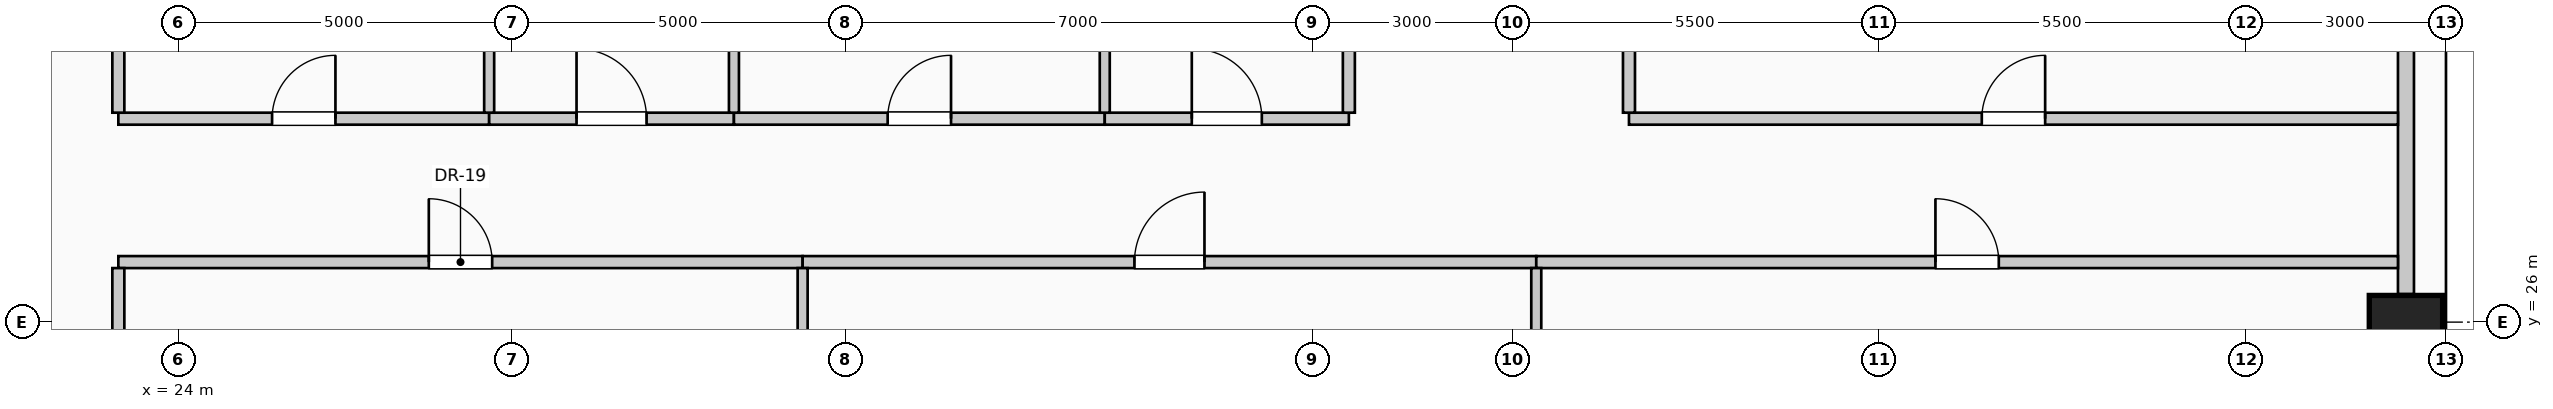
"""IFC4 building model, lengths in metres.
Left out: names, types, materials, properties, quantities, classifications, styles, units other than length and angle.
Written with IfcOpenShell. Run it as: python <this file> out.ifc"""

import sys

from ifc_helpers import new_model, si_unit, direction, frame, frame_2d, origin, origin_2d, place, context, subcontext, project, spatial, rectangle, extrude, element, fill, save


model = new_model("IFC4")
c1 = context("Model", 3, precision=1e-05, world=origin(), true_north=direction((0.0, 1.0)))
c2 = subcontext(c1, "Body", "Model", "MODEL_VIEW")
j1 = project(units=[si_unit("LENGTHUNIT", "METRE"), si_unit("PLANEANGLEUNIT", "RADIAN")], contexts=[c1])
p1 = place(None, origin())
s1 = spatial("IfcSite", under=j1, at=p1, CompositionType="ELEMENT")
p2 = place(p1, origin())
s2 = spatial("IfcBuilding", under=s1, at=p2, CompositionType="ELEMENT")
p3 = place(p2, frame((0.0, 0.0, 174.6)))
s3 = spatial("IfcBuildingStorey", under=s2, at=p3, CompositionType="ELEMENT", Elevation=174.6)
p4 = place(p3, frame((57.4, 26.0, 0.0), z_axis=(0.0, 0.0, 1.0), x_axis=(0.0, 1.0, 0.0)))
e1 = element("IfcColumn", 1, at=p4, inside=s3, PredefinedType="COLUMN", context=c2, shape_type="SweptSolid", body=[
    extrude(rectangle(XDim=0.8, YDim=1.1, at=origin_2d()), origin(), (0.0, 0.0, 1.0), 4.0),
])
p5 = place(p3, frame((57.4, 33.58, 0.0), z_axis=(0.0, 0.0, 1.0), x_axis=(0.0, -1.0, 0.0)))
e2 = element("IfcWall", 2, at=p5, inside=s3, PredefinedType="SOLIDWALL", context=c2, shape_type="SweptSolid", body=[
    extrude(rectangle(XDim=7.16, YDim=0.24, at=frame_2d((3.58, 0.0))), origin(), (0.0, 0.0, 1.0), 2.975),
])
p6 = place(p3, frame((23.1, 26.9, 0.0), z_axis=(0.0, 0.0, 1.0), x_axis=(1.0, 0.0, 0.0)))
e3 = element("IfcWall", 3, at=p6, inside=s3, PredefinedType="PARTITIONING", context=c2, shape_type="SweptSolid", body=[
    extrude(rectangle(XDim=10.26, YDim=0.18, at=frame_2d((5.13, 0.0))), origin(), (0.0, 0.0, 1.0), 3.725),
])
p7 = place(p6, frame((4.655, 0.0, 0.0)))
e4 = element("IfcOpeningElement", 4, at=p7, cuts=e3, PredefinedType="OPENING", context=c2, shape_type="SweptSolid", body=[
    extrude(rectangle(XDim=0.95, YDim=2.15, at=frame_2d((0.475, 1.075))), frame((0.0, 0.1, 0.0), z_axis=(0.0, -1.0, 0.0), x_axis=(1.0, 0.0, 0.0)), (0.0, 0.0, 1.0), 0.2),
])
p8 = place(p3, frame((33.36, 26.9, 0.0), z_axis=(0.0, 0.0, 1.0), x_axis=(1.0, 0.0, 0.0)))
e5 = element("IfcWall", 5, at=p8, inside=s3, PredefinedType="PARTITIONING", context=c2, shape_type="SweptSolid", body=[
    extrude(rectangle(XDim=11.0, YDim=0.18, at=frame_2d((5.5, 0.0))), origin(), (0.0, 0.0, 1.0), 3.725),
])
p9 = place(p8, frame((4.975, 0.0, 0.0)))
e6 = element("IfcOpeningElement", 6, at=p9, cuts=e5, PredefinedType="OPENING", context=c2, shape_type="SweptSolid", body=[
    extrude(rectangle(XDim=1.05, YDim=2.15, at=frame_2d((0.525, 1.075))), frame((0.0, 0.1, 0.0), z_axis=(0.0, -1.0, 0.0), x_axis=(1.0, 0.0, 0.0)), (0.0, 0.0, 1.0), 0.2),
])
p10 = place(p3, frame((44.36, 26.9, 0.0), z_axis=(0.0, 0.0, 1.0), x_axis=(1.0, 0.0, 0.0)))
e7 = element("IfcWall", 7, at=p10, inside=s3, PredefinedType="PARTITIONING", context=c2, shape_type="SweptSolid", body=[
    extrude(rectangle(XDim=12.92, YDim=0.18, at=frame_2d((6.46, 0.0))), origin(), (0.0, 0.0, 1.0), 3.725),
])
p11 = place(p10, frame((5.985, 0.0, 0.0)))
e8 = element("IfcOpeningElement", 8, at=p11, cuts=e7, PredefinedType="OPENING", context=c2, shape_type="SweptSolid", body=[
    extrude(rectangle(XDim=0.95, YDim=2.15, at=frame_2d((0.475, 1.075))), frame((0.0, 0.1, 0.0), z_axis=(0.0, -1.0, 0.0), x_axis=(1.0, 0.0, 0.0)), (0.0, 0.0, 1.0), 0.2),
])
p12 = place(p3, frame((23.1, 29.05, 0.0), z_axis=(0.0, 0.0, 1.0), x_axis=(1.0, 0.0, 0.0)))
e9 = element("IfcWall", 9, at=p12, inside=s3, PredefinedType="PARTITIONING", context=c2, shape_type="SweptSolid", body=[
    extrude(rectangle(XDim=5.56, YDim=0.18, at=frame_2d((2.78, 0.0))), origin(), (0.0, 0.0, 1.0), 3.725),
])
p13 = place(p12, frame((2.305, 0.0, 0.0)))
e10 = element("IfcOpeningElement", 10, at=p13, cuts=e9, PredefinedType="OPENING", context=c2, shape_type="SweptSolid", body=[
    extrude(rectangle(XDim=0.95, YDim=2.15, at=frame_2d((0.475, 1.075))), frame((0.0, 0.1, 0.0), z_axis=(0.0, -1.0, 0.0), x_axis=(1.0, 0.0, 0.0)), (0.0, 0.0, 1.0), 0.2),
])
p14 = place(p3, frame((28.66, 29.05, 0.0), z_axis=(0.0, 0.0, 1.0), x_axis=(1.0, 0.0, 0.0)))
e11 = element("IfcWall", 11, at=p14, inside=s3, PredefinedType="PARTITIONING", context=c2, shape_type="SweptSolid", body=[
    extrude(rectangle(XDim=3.67, YDim=0.18, at=frame_2d((1.835, 0.0))), origin(), (0.0, 0.0, 1.0), 3.725),
])
p15 = place(p14, frame((1.31, 0.0, 0.0)))
e12 = element("IfcOpeningElement", 12, at=p15, cuts=e11, PredefinedType="OPENING", context=c2, shape_type="SweptSolid", body=[
    extrude(rectangle(XDim=1.05, YDim=2.15, at=frame_2d((0.525, 1.075))), frame((0.0, 0.1, 0.0), z_axis=(0.0, -1.0, 0.0), x_axis=(1.0, 0.0, 0.0)), (0.0, 0.0, 1.0), 0.2),
])
p16 = place(p3, frame((32.33, 29.05, 0.0), z_axis=(0.0, 0.0, 1.0), x_axis=(1.0, 0.0, 0.0)))
e13 = element("IfcWall", 13, at=p16, inside=s3, PredefinedType="PARTITIONING", context=c2, shape_type="SweptSolid", body=[
    extrude(rectangle(XDim=5.56, YDim=0.18, at=frame_2d((2.78, 0.0))), origin(), (0.0, 0.0, 1.0), 3.725),
])
p17 = place(p16, frame((2.305, 0.0, 0.0)))
e14 = element("IfcOpeningElement", 14, at=p17, cuts=e13, PredefinedType="OPENING", context=c2, shape_type="SweptSolid", body=[
    extrude(rectangle(XDim=0.95, YDim=2.15, at=frame_2d((0.475, 1.075))), frame((0.0, 0.1, 0.0), z_axis=(0.0, -1.0, 0.0), x_axis=(1.0, 0.0, 0.0)), (0.0, 0.0, 1.0), 0.2),
])
p18 = place(p3, frame((37.89, 29.05, 0.0), z_axis=(0.0, 0.0, 1.0), x_axis=(1.0, 0.0, 0.0)))
e15 = element("IfcWall", 15, at=p18, inside=s3, PredefinedType="PARTITIONING", context=c2, shape_type="SweptSolid", body=[
    extrude(rectangle(XDim=3.66, YDim=0.18, at=frame_2d((1.83, 0.0))), origin(), (0.0, 0.0, 1.0), 3.725),
])
p19 = place(p18, frame((1.305, 0.0, 0.0)))
e16 = element("IfcOpeningElement", 16, at=p19, cuts=e15, PredefinedType="OPENING", context=c2, shape_type="SweptSolid", body=[
    extrude(rectangle(XDim=1.05, YDim=2.15, at=frame_2d((0.525, 1.075))), frame((0.0, 0.1, 0.0), z_axis=(0.0, -1.0, 0.0), x_axis=(1.0, 0.0, 0.0)), (0.0, 0.0, 1.0), 0.2),
])
p20 = place(p3, frame((45.75, 29.05, 0.0), z_axis=(0.0, 0.0, 1.0), x_axis=(1.0, 0.0, 0.0)))
e17 = element("IfcWall", 17, at=p20, inside=s3, PredefinedType="PARTITIONING", context=c2, shape_type="SweptSolid", body=[
    extrude(rectangle(XDim=11.53, YDim=0.18, at=frame_2d((5.765, 0.0))), origin(), (0.0, 0.0, 1.0), 3.725),
])
p21 = place(p20, frame((5.29, 0.0, 0.0)))
e18 = element("IfcOpeningElement", 18, at=p21, cuts=e17, PredefinedType="OPENING", context=c2, shape_type="SweptSolid", body=[
    extrude(rectangle(XDim=0.95, YDim=2.15, at=frame_2d((0.475, 1.075))), frame((0.0, 0.1, 0.0), z_axis=(0.0, -1.0, 0.0), x_axis=(1.0, 0.0, 0.0)), (0.0, 0.0, 1.0), 0.2),
])
p22 = place(p3, frame((23.1, 17.3, 0.0), z_axis=(0.0, 0.0, 1.0), x_axis=(0.0, 1.0, 0.0)))
e19 = element("IfcWall", 19, at=p22, inside=s3, PredefinedType="PARTITIONING", context=c2, shape_type="SweptSolid", body=[
    extrude(rectangle(XDim=9.51, YDim=0.18, at=frame_2d((4.755, 0.0))), origin(), (0.0, 0.0, 1.0), 3.725),
])
p23 = place(p3, frame((23.1, 29.14, 0.0), z_axis=(0.0, 0.0, 1.0), x_axis=(0.0, 1.0, 0.0)))
e20 = element("IfcWall", 20, at=p23, inside=s3, PredefinedType="PARTITIONING", context=c2, shape_type="SweptSolid", body=[
    extrude(rectangle(XDim=3.12, YDim=0.18, at=frame_2d((1.56, 0.0))), origin(), (0.0, 0.0, 1.0), 3.725),
])
p24 = place(p3, frame((28.66, 29.14, 0.0), z_axis=(0.0, 0.0, 1.0), x_axis=(0.0, 1.0, 0.0)))
e21 = element("IfcWall", 21, at=p24, inside=s3, PredefinedType="PARTITIONING", context=c2, shape_type="SweptSolid", body=[
    extrude(rectangle(XDim=4.435, YDim=0.15, at=frame_2d((2.218, 0.0))), origin(), (0.0, 0.0, 1.0), 3.725),
])
p25 = place(p3, frame((32.33, 29.14, 0.0), z_axis=(0.0, 0.0, 1.0), x_axis=(0.0, 1.0, 0.0)))
e22 = element("IfcWall", 22, at=p25, inside=s3, PredefinedType="PARTITIONING", context=c2, shape_type="SweptSolid", body=[
    extrude(rectangle(XDim=16.14, YDim=0.15, at=frame_2d((8.07, 0.0))), origin(), (0.0, 0.0, 1.0), 3.725),
])
p26 = place(p3, frame((33.36, 0.72, 0.0), z_axis=(0.0, 0.0, 1.0), x_axis=(0.0, 1.0, 0.0)))
e23 = element("IfcWall", 23, at=p26, inside=s3, PredefinedType="PARTITIONING", context=c2, shape_type="SweptSolid", body=[
    extrude(rectangle(XDim=26.09, YDim=0.15, at=frame_2d((13.045, 0.0))), origin(), (0.0, 0.0, 1.0), 3.725),
])
p27 = place(p3, frame((37.89, 29.14, 0.0), z_axis=(0.0, 0.0, 1.0), x_axis=(0.0, 1.0, 0.0)))
e24 = element("IfcWall", 24, at=p27, inside=s3, PredefinedType="PARTITIONING", context=c2, shape_type="SweptSolid", body=[
    extrude(rectangle(XDim=16.14, YDim=0.15, at=frame_2d((8.07, 0.0))), origin(), (0.0, 0.0, 1.0), 3.725),
])
p28 = place(p3, frame((41.55, 29.14, 0.0), z_axis=(0.0, 0.0, 1.0), x_axis=(0.0, 1.0, 0.0)))
e25 = element("IfcWall", 25, at=p28, inside=s3, PredefinedType="PARTITIONING", context=c2, shape_type="SweptSolid", body=[
    extrude(rectangle(XDim=3.21, YDim=0.18, at=frame_2d((1.605, 0.0))), origin(), (0.0, 0.0, 1.0), 3.12),
])
p29 = place(p3, frame((44.36, 1.15, 0.0), z_axis=(0.0, 0.0, 1.0), x_axis=(0.0, 1.0, 0.0)))
e26 = element("IfcWall", 26, at=p29, inside=s3, PredefinedType="PARTITIONING", context=c2, shape_type="SweptSolid", body=[
    extrude(rectangle(XDim=25.66, YDim=0.15, at=frame_2d((12.83, 0.0))), origin(), (0.0, 0.0, 1.0), 3.725),
])
p30 = place(p3, frame((45.75, 29.14, 0.0), z_axis=(0.0, 0.0, 1.0), x_axis=(0.0, 1.0, 0.0)))
e27 = element("IfcWall", 27, at=p30, inside=s3, PredefinedType="PARTITIONING", context=c2, shape_type="SweptSolid", body=[
    extrude(rectangle(XDim=3.135, YDim=0.18, at=frame_2d((1.567, 0.0))), origin(), (0.0, 0.0, 1.0), 3.725),
])
p31 = place(p7, origin())
e28 = element("IfcDoor", 28, at=p31, inside=s3, OperationType="SINGLE_SWING_LEFT", PredefinedType="DOOR", context=c2, shape_type="SweptSolid", body=[
    extrude(rectangle(XDim=0.95, YDim=2.15, at=frame_2d((0.475, 1.075))), frame((0.0, 0.025, 0.0), z_axis=(0.0, -1.0, 0.0), x_axis=(1.0, 0.0, 0.0)), (0.0, 0.0, 1.0), 0.05),
])
fill(e4, e28)
p32 = place(p9, origin())
e29 = element("IfcDoor", 29, at=p32, inside=s3, OperationType="SINGLE_SWING_RIGHT", PredefinedType="DOOR", context=c2, shape_type="SweptSolid", body=[
    extrude(rectangle(XDim=1.05, YDim=2.15, at=frame_2d((0.525, 1.075))), frame((0.0, 0.025, 0.0), z_axis=(0.0, -1.0, 0.0), x_axis=(1.0, 0.0, 0.0)), (0.0, 0.0, 1.0), 0.05),
])
fill(e6, e29)
p33 = place(p11, origin())
e30 = element("IfcDoor", 30, at=p33, inside=s3, OperationType="SINGLE_SWING_LEFT", PredefinedType="DOOR", context=c2, shape_type="SweptSolid", body=[
    extrude(rectangle(XDim=0.95, YDim=2.15, at=frame_2d((0.475, 1.075))), frame((0.0, 0.025, 0.0), z_axis=(0.0, -1.0, 0.0), x_axis=(1.0, 0.0, 0.0)), (0.0, 0.0, 1.0), 0.05),
])
fill(e8, e30)
p34 = place(p13, origin())
e31 = element("IfcDoor", 31, at=p34, inside=s3, OperationType="SINGLE_SWING_RIGHT", PredefinedType="DOOR", context=c2, shape_type="SweptSolid", body=[
    extrude(rectangle(XDim=0.95, YDim=2.15, at=frame_2d((0.475, 1.075))), frame((0.0, 0.025, 0.0), z_axis=(0.0, -1.0, 0.0), x_axis=(1.0, 0.0, 0.0)), (0.0, 0.0, 1.0), 0.05),
])
fill(e10, e31)
p35 = place(p15, origin())
e32 = element("IfcDoor", 32, at=p35, inside=s3, OperationType="SINGLE_SWING_LEFT", PredefinedType="DOOR", context=c2, shape_type="SweptSolid", body=[
    extrude(rectangle(XDim=1.05, YDim=2.15, at=frame_2d((0.525, 1.075))), frame((0.0, 0.025, 0.0), z_axis=(0.0, -1.0, 0.0), x_axis=(1.0, 0.0, 0.0)), (0.0, 0.0, 1.0), 0.05),
])
fill(e12, e32)
p36 = place(p17, origin())
e33 = element("IfcDoor", 33, at=p36, inside=s3, OperationType="SINGLE_SWING_RIGHT", PredefinedType="DOOR", context=c2, shape_type="SweptSolid", body=[
    extrude(rectangle(XDim=0.95, YDim=2.15, at=frame_2d((0.475, 1.075))), frame((0.0, 0.025, 0.0), z_axis=(0.0, -1.0, 0.0), x_axis=(1.0, 0.0, 0.0)), (0.0, 0.0, 1.0), 0.05),
])
fill(e14, e33)
p37 = place(p19, origin())
e34 = element("IfcDoor", 34, at=p37, inside=s3, OperationType="SINGLE_SWING_LEFT", PredefinedType="DOOR", context=c2, shape_type="SweptSolid", body=[
    extrude(rectangle(XDim=1.05, YDim=2.15, at=frame_2d((0.525, 1.075))), frame((0.0, 0.025, 0.0), z_axis=(0.0, -1.0, 0.0), x_axis=(1.0, 0.0, 0.0)), (0.0, 0.0, 1.0), 0.05),
])
fill(e16, e34)
p38 = place(p21, origin())
e35 = element("IfcDoor", 35, at=p38, inside=s3, OperationType="SINGLE_SWING_RIGHT", PredefinedType="DOOR", context=c2, shape_type="SweptSolid", body=[
    extrude(rectangle(XDim=0.95, YDim=2.15, at=frame_2d((0.475, 1.075))), frame((0.0, 0.025, 0.0), z_axis=(0.0, -1.0, 0.0), x_axis=(1.0, 0.0, 0.0)), (0.0, 0.0, 1.0), 0.05),
])
fill(e18, e35)
save(model, sys.argv[1])
